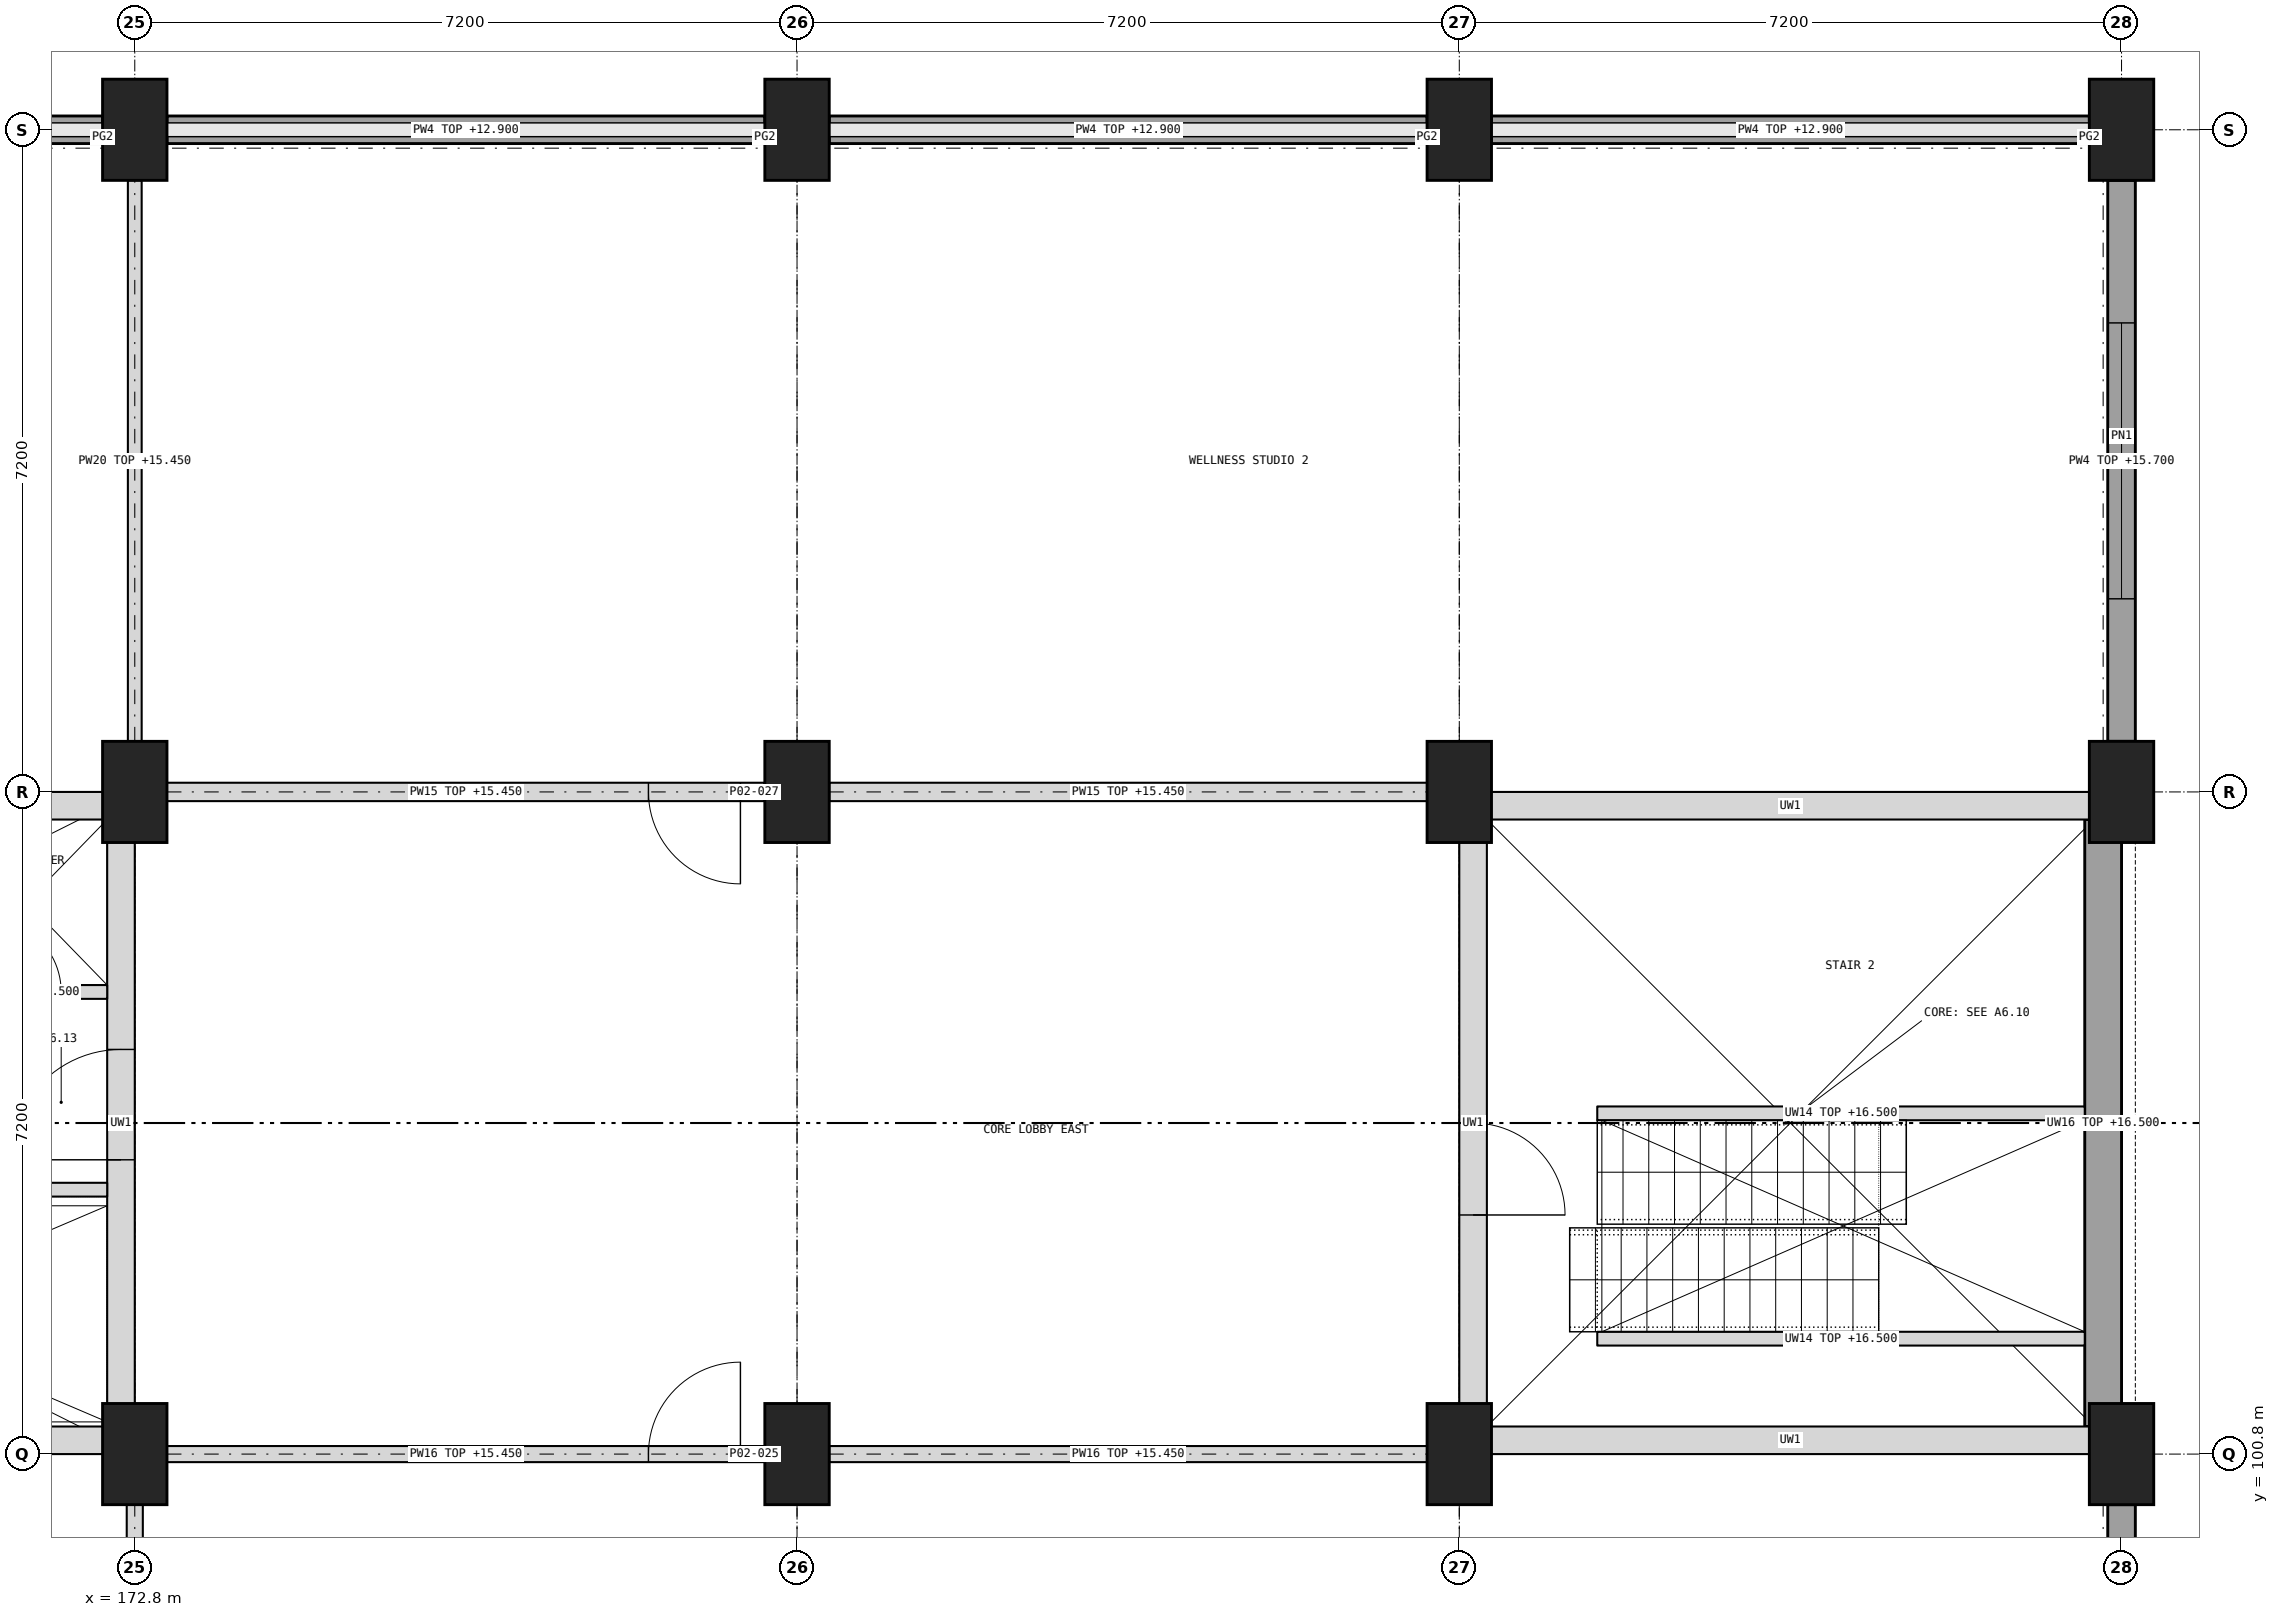
"""IFC4 building model, lengths in metres.
Left out: names, types, materials, properties, quantities, classifications, styles, units other than length and angle.
Written with IfcOpenShell. Run it as: python <this file> out.ifc"""

import sys

from ifc_helpers import new_model, si_unit, direction, frame, frame_2d, origin, origin_2d, place, context, subcontext, project, spatial, rectangle, extrude, element, fill, save


model = new_model("IFC4")
c1 = context("Model", 3, precision=1e-05, world=origin(), true_north=direction((0.0, 1.0)))
c2 = subcontext(c1, "Body", "Model", "MODEL_VIEW")
j1 = project(units=[si_unit("LENGTHUNIT", "METRE"), si_unit("PLANEANGLEUNIT", "RADIAN")], contexts=[c1])
p1 = place(None, origin())
s1 = spatial("IfcSite", under=j1, at=p1, CompositionType="ELEMENT")
p2 = place(p1, origin())
s2 = spatial("IfcBuilding", under=s1, at=p2, CompositionType="ELEMENT")
p3 = place(p2, frame((0.0, 0.0, 12.0)))
s3 = spatial("IfcBuildingStorey", under=s2, at=p3, CompositionType="ELEMENT", Elevation=12.0)
for number, where, z_axis, x_axis in (
    (1, (172.8, 100.8, 0.0), (0.0, 0.0, 1.0), (1.0, 0.0, 0.0)),
    (2, (172.8, 108.0, 0.0), (0.0, 0.0, 1.0), (1.0, 0.0, 0.0)),
    (3, (172.8, 115.2, 0.0), (0.0, 0.0, 1.0), (1.0, 0.0, 0.0)),
    (4, (180.0, 100.8, 0.0), (0.0, 0.0, 1.0), (1.0, 0.0, 0.0)),
    (5, (180.0, 108.0, 0.0), (0.0, 0.0, 1.0), (1.0, 0.0, 0.0)),
    (6, (180.0, 115.2, 0.0), (0.0, 0.0, 1.0), (1.0, 0.0, 0.0)),
    (7, (187.2, 100.8, 0.0), (0.0, 0.0, 1.0), (1.0, 0.0, 0.0)),
    (8, (187.2, 108.0, 0.0), (0.0, 0.0, 1.0), (1.0, 0.0, 0.0)),
    (9, (187.2, 115.2, 0.0), (0.0, 0.0, 1.0), (1.0, 0.0, 0.0)),
    (10, (194.4, 100.8, 0.0), (0.0, 0.0, 1.0), (1.0, 0.0, 0.0)),
    (11, (194.4, 108.0, 0.0), (0.0, 0.0, 1.0), (1.0, 0.0, 0.0)),
    (12, (194.4, 115.2, 0.0), (0.0, 0.0, 1.0), (1.0, 0.0, 0.0)),
):
    element("IfcColumn", number, at=place(p3, frame(where, z_axis=z_axis, x_axis=x_axis)), inside=s3, PredefinedType="COLUMN", context=c2, shape_type="SweptSolid", body=[
        extrude(rectangle(XDim=0.7, YDim=1.1, at=origin_2d()), origin(), (0.0, 0.0, 1.0), 4.5),
    ])
for number, where, z_axis, x_axis in (
    (13, (158.4, 100.95, 0.0), (0.0, 0.0, 1.0), (1.0, 0.0, 0.0)),
    (14, (158.4, 107.85, 0.0), (0.0, 0.0, 1.0), (1.0, 0.0, 0.0)),
):
    element("IfcWall", number, at=place(p3, frame(where, z_axis=z_axis, x_axis=x_axis)), inside=s3, PredefinedType="SHEAR", context=c2, shape_type="SweptSolid", body=[
        extrude(rectangle(XDim=14.4, YDim=0.3, at=frame_2d((7.2, 0.0))), origin(), (0.0, 0.0, 1.0), 4.5),
    ])
p4 = place(p3, frame((172.65, 101.1, 0.0), z_axis=(0.0, 0.0, 1.0), x_axis=(0.0, 1.0, 0.0)))
e15 = element("IfcWall", 15, at=p4, inside=s3, PredefinedType="SHEAR", context=c2, shape_type="SweptSolid", body=[
    extrude(rectangle(XDim=6.6, YDim=0.3, at=frame_2d((3.3, 0.0))), origin(), (0.0, 0.0, 1.0), 4.5),
])
p5 = place(p4, frame((2.9, 0.0, 0.0)))
e16 = element("IfcOpeningElement", 16, at=p5, cuts=e15, PredefinedType="OPENING", context=c2, shape_type="SweptSolid", body=[
    extrude(rectangle(XDim=1.2, YDim=2.1, at=frame_2d((0.6, 1.05))), frame((0.0, 0.16, 0.0), z_axis=(0.0, -1.0, 0.0), x_axis=(1.0, 0.0, 0.0)), (0.0, 0.0, 1.0), 0.32),
])
p6 = place(p3, frame((165.75, 103.675, 0.0), z_axis=(0.0, 0.0, 1.0), x_axis=(1.0, 0.0, 0.0)))
e17 = element("IfcWall", 17, at=p6, inside=s3, PredefinedType="SHEAR", context=c2, shape_type="SweptSolid", body=[
    extrude(rectangle(XDim=6.75, YDim=0.15, at=frame_2d((3.375, 0.0))), origin(), (0.0, 0.0, 1.0), 4.5),
])
p7 = place(p6, frame((0.1, 0.0, 0.0)))
e18 = element("IfcOpeningElement", 18, at=p7, cuts=e17, PredefinedType="OPENING", context=c2, shape_type="SweptSolid", body=[
    extrude(rectangle(XDim=1.0, YDim=2.1, at=frame_2d((0.5, 1.05))), frame((0.0, 0.085, 0.0), z_axis=(0.0, -1.0, 0.0), x_axis=(1.0, 0.0, 0.0)), (0.0, 0.0, 1.0), 0.17),
])
p8 = place(p3, frame((170.75, 105.825, 0.0), z_axis=(0.0, 0.0, 1.0), x_axis=(1.0, 0.0, 0.0)))
e19 = element("IfcWall", 19, at=p8, inside=s3, PredefinedType="PARTITIONING", context=c2, shape_type="SweptSolid", body=[
    extrude(rectangle(XDim=1.75, YDim=0.15, at=frame_2d((0.875, 0.0))), origin(), (0.0, 0.0, 1.0), 4.5),
])
p9 = place(p8, frame((0.45, 0.0, 0.0)))
e20 = element("IfcOpeningElement", 20, at=p9, cuts=e19, PredefinedType="OPENING", context=c2, shape_type="SweptSolid", body=[
    extrude(rectangle(XDim=0.8, YDim=2.1, at=frame_2d((0.4, 1.05))), frame((0.0, 0.085, 0.0), z_axis=(0.0, -1.0, 0.0), x_axis=(1.0, 0.0, 0.0)), (0.0, 0.0, 1.0), 0.17),
])
for number, where, z_axis, x_axis in (
    (21, (194.4, 100.95, 0.0), (0.0, 0.0, 1.0), (-1.0, 0.0, 0.0)),
    (22, (194.4, 107.85, 0.0), (0.0, 0.0, 1.0), (-1.0, 0.0, 0.0)),
):
    element("IfcWall", number, at=place(p3, frame(where, z_axis=z_axis, x_axis=x_axis)), inside=s3, PredefinedType="SHEAR", context=c2, shape_type="SweptSolid", body=[
        extrude(rectangle(XDim=7.2, YDim=0.3, at=frame_2d((3.6, 0.0))), origin(), (0.0, 0.0, 1.0), 4.5),
    ])
p10 = place(p3, frame((187.35, 101.1, 0.0), z_axis=(0.0, 0.0, 1.0), x_axis=(0.0, 1.0, 0.0)))
e23 = element("IfcWall", 23, at=p10, inside=s3, PredefinedType="SHEAR", context=c2, shape_type="SweptSolid", body=[
    extrude(rectangle(XDim=6.6, YDim=0.3, at=frame_2d((3.3, 0.0))), origin(), (0.0, 0.0, 1.0), 4.5),
])
p11 = place(p10, frame((2.3, 0.0, 0.0)))
e24 = element("IfcOpeningElement", 24, at=p11, cuts=e23, PredefinedType="OPENING", context=c2, shape_type="SweptSolid", body=[
    extrude(rectangle(XDim=1.0, YDim=2.1, at=frame_2d((0.5, 1.05))), frame((0.0, 0.16, 0.0), z_axis=(0.0, -1.0, 0.0), x_axis=(1.0, 0.0, 0.0)), (0.0, 0.0, 1.0), 0.32),
])
p12 = place(p3, frame((194.2, 101.1, 0.0), z_axis=(0.0, 0.0, 1.0), x_axis=(0.0, 1.0, 0.0)))
e25 = element("IfcWall", 25, at=p12, inside=s3, PredefinedType="SHEAR", context=c2, shape_type="SweptSolid", body=[
    extrude(rectangle(XDim=6.6, YDim=0.4, at=frame_2d((3.3, 0.0))), origin(), (0.0, 0.0, 1.0), 4.5),
])
for number, where, z_axis, x_axis in (
    (26, (188.7, 102.055, 0.0), (0.0, 0.0, 1.0), (1.0, 0.0, 0.0)),
    (27, (188.7, 104.505, 0.0), (0.0, 0.0, 1.0), (1.0, 0.0, 0.0)),
):
    element("IfcWall", number, at=place(p3, frame(where, z_axis=z_axis, x_axis=x_axis)), inside=s3, PredefinedType="SHEAR", context=c2, shape_type="SweptSolid", body=[
        extrude(rectangle(XDim=5.3, YDim=0.15, at=frame_2d((2.65, 0.0))), origin(), (0.0, 0.0, 1.0), 4.5),
    ])
for number, where, z_axis, x_axis in (
    (28, (165.95, 115.2, 0.0), (0.0, 0.0, 1.0), (1.0, 0.0, 0.0)),
    (29, (173.15, 115.2, 0.0), (0.0, 0.0, 1.0), (1.0, 0.0, 0.0)),
    (30, (180.35, 115.2, 0.0), (0.0, 0.0, 1.0), (1.0, 0.0, 0.0)),
    (31, (187.55, 115.2, 0.0), (0.0, 0.0, 1.0), (1.0, 0.0, 0.0)),
):
    element("IfcWall", number, at=place(p3, frame(where, z_axis=z_axis, x_axis=x_axis)), inside=s3, PredefinedType="SOLIDWALL", context=c2, shape_type="SweptSolid", body=[
        extrude(rectangle(XDim=6.5, YDim=0.3, at=frame_2d((3.25, 0.0))), origin(), (0.0, 0.0, 1.0), 0.9),
    ])
p13 = place(p3, frame((194.4, 94.15, 0.0), z_axis=(0.0, 0.0, 1.0), x_axis=(0.0, 1.0, 0.0)))
e32 = element("IfcWall", 32, at=p13, inside=s3, PredefinedType="SOLIDWALL", context=c2, shape_type="SweptSolid", body=[
    extrude(rectangle(XDim=6.1, YDim=0.3, at=frame_2d((3.05, 0.0))), origin(), (0.0, 0.0, 1.0), 3.7),
])
p14 = place(p13, frame((2.475, 0.0, 0.9)))
e33 = element("IfcOpeningElement", 33, at=p14, cuts=e32, PredefinedType="OPENING", context=c2, shape_type="SweptSolid", body=[
    extrude(rectangle(XDim=3.0, YDim=2.4, at=frame_2d((1.5, 1.2))), frame((0.0, 0.16, 0.0), z_axis=(0.0, -1.0, 0.0), x_axis=(1.0, 0.0, 0.0)), (0.0, 0.0, 1.0), 0.32),
])
p15 = place(p3, frame((194.4, 108.55, 0.0), z_axis=(0.0, 0.0, 1.0), x_axis=(0.0, 1.0, 0.0)))
e34 = element("IfcWall", 34, at=p15, inside=s3, PredefinedType="SOLIDWALL", context=c2, shape_type="SweptSolid", body=[
    extrude(rectangle(XDim=6.1, YDim=0.3, at=frame_2d((3.05, 0.0))), origin(), (0.0, 0.0, 1.0), 3.7),
])
p16 = place(p15, frame((1.55, 0.0, 0.9)))
e35 = element("IfcOpeningElement", 35, at=p16, cuts=e34, PredefinedType="OPENING", context=c2, shape_type="SweptSolid", body=[
    extrude(rectangle(XDim=3.0, YDim=2.4, at=frame_2d((1.5, 1.2))), frame((0.0, 0.16, 0.0), z_axis=(0.0, -1.0, 0.0), x_axis=(1.0, 0.0, 0.0)), (0.0, 0.0, 1.0), 0.32),
])
p17 = place(p3, frame((172.8, 96.087, 0.0), z_axis=(0.0, 0.0, 1.0), x_axis=(0.0, 1.0, 0.0)))
e36 = element("IfcWall", 36, at=p17, inside=s3, PredefinedType="PARTITIONING", context=c2, shape_type="SweptSolid", body=[
    extrude(rectangle(XDim=4.163, YDim=0.175, at=frame_2d((2.081, 0.0))), origin(), (0.0, 0.0, 1.0), 3.45),
])
p18 = place(p3, frame((172.8, 108.55, 0.0), z_axis=(0.0, 0.0, 1.0), x_axis=(0.0, 1.0, 0.0)))
e37 = element("IfcWall", 37, at=p18, inside=s3, PredefinedType="PARTITIONING", context=c2, shape_type="SweptSolid", body=[
    extrude(rectangle(XDim=6.1, YDim=0.15, at=frame_2d((3.05, 0.0))), origin(), (0.0, 0.0, 1.0), 3.45),
])
p19 = place(p3, frame((173.15, 108.0, 0.0), z_axis=(0.0, 0.0, 1.0), x_axis=(1.0, 0.0, 0.0)))
e38 = element("IfcWall", 38, at=p19, inside=s3, PredefinedType="PARTITIONING", context=c2, shape_type="SweptSolid", body=[
    extrude(rectangle(XDim=6.5, YDim=0.2, at=frame_2d((3.25, 0.0))), origin(), (0.0, 0.0, 1.0), 3.45),
])
p20 = place(p19, frame((5.235, 0.0, 0.0)))
e39 = element("IfcOpeningElement", 39, at=p20, cuts=e38, PredefinedType="OPENING", context=c2, shape_type="SweptSolid", body=[
    extrude(rectangle(XDim=1.0, YDim=2.1, at=frame_2d((0.5, 1.05))), frame((0.0, 0.11, 0.0), z_axis=(0.0, -1.0, 0.0), x_axis=(1.0, 0.0, 0.0)), (0.0, 0.0, 1.0), 0.22),
])
p21 = place(p3, frame((180.35, 108.0, 0.0), z_axis=(0.0, 0.0, 1.0), x_axis=(1.0, 0.0, 0.0)))
e40 = element("IfcWall", 40, at=p21, inside=s3, PredefinedType="PARTITIONING", context=c2, shape_type="SweptSolid", body=[
    extrude(rectangle(XDim=6.5, YDim=0.2, at=frame_2d((3.25, 0.0))), origin(), (0.0, 0.0, 1.0), 3.45),
])
p22 = place(p3, frame((173.15, 100.8, 0.0), z_axis=(0.0, 0.0, 1.0), x_axis=(1.0, 0.0, 0.0)))
e41 = element("IfcWall", 41, at=p22, inside=s3, PredefinedType="PARTITIONING", context=c2, shape_type="SweptSolid", body=[
    extrude(rectangle(XDim=6.5, YDim=0.175, at=frame_2d((3.25, 0.0))), origin(), (0.0, 0.0, 1.0), 3.45),
])
p23 = place(p22, frame((5.235, 0.0, 0.0)))
e42 = element("IfcOpeningElement", 42, at=p23, cuts=e41, PredefinedType="OPENING", context=c2, shape_type="SweptSolid", body=[
    extrude(rectangle(XDim=1.0, YDim=2.1, at=frame_2d((0.5, 1.05))), frame((0.0, 0.097, 0.0), z_axis=(0.0, -1.0, 0.0), x_axis=(1.0, 0.0, 0.0)), (0.0, 0.0, 1.0), 0.195),
])
p24 = place(p3, frame((180.35, 100.8, 0.0), z_axis=(0.0, 0.0, 1.0), x_axis=(1.0, 0.0, 0.0)))
e43 = element("IfcWall", 43, at=p24, inside=s3, PredefinedType="PARTITIONING", context=c2, shape_type="SweptSolid", body=[
    extrude(rectangle(XDim=6.5, YDim=0.175, at=frame_2d((3.25, 0.0))), origin(), (0.0, 0.0, 1.0), 3.45),
])
p25 = place(p16, origin())
e44 = element("IfcWindow", 44, at=p25, inside=s3, PartitioningType="DOUBLE_PANEL_VERTICAL", PredefinedType="WINDOW", context=c2, shape_type="SweptSolid", body=[
    extrude(rectangle(XDim=3.0, YDim=2.4, at=frame_2d((1.5, 1.2))), frame((0.0, 0.12, 0.0), z_axis=(0.0, -1.0, 0.0), x_axis=(1.0, 0.0, 0.0)), (0.0, 0.0, 1.0), 0.06),
])
fill(e35, e44)
p26 = place(p23, origin())
e45 = element("IfcDoor", 45, at=p26, inside=s3, OperationType="SINGLE_SWING_RIGHT", PredefinedType="DOOR", context=c2, shape_type="SweptSolid", body=[
    extrude(rectangle(XDim=1.0, YDim=2.1, at=frame_2d((0.5, 1.05))), frame((0.0, 0.025, 0.0), z_axis=(0.0, -1.0, 0.0), x_axis=(1.0, 0.0, 0.0)), (0.0, 0.0, 1.0), 0.05),
])
fill(e42, e45)
p27 = place(p20, frame((1.0, 0.0, 0.0), z_axis=(0.0, 0.0, 1.0), x_axis=(-1.0, 0.0, 0.0)))
e46 = element("IfcDoor", 46, at=p27, inside=s3, OperationType="SINGLE_SWING_LEFT", PredefinedType="DOOR", context=c2, shape_type="SweptSolid", body=[
    extrude(rectangle(XDim=1.0, YDim=2.1, at=frame_2d((0.5, 1.05))), frame((0.0, 0.025, 0.0), z_axis=(0.0, -1.0, 0.0), x_axis=(1.0, 0.0, 0.0)), (0.0, 0.0, 1.0), 0.05),
])
fill(e39, e46)
p28 = place(p5, origin())
e47 = element("IfcDoor", 47, at=p28, inside=s3, OperationType="SINGLE_SWING_LEFT", PredefinedType="DOOR", context=c2, shape_type="SweptSolid", body=[
    extrude(rectangle(XDim=1.2, YDim=2.1, at=frame_2d((0.6, 1.05))), frame((0.0, 0.025, 0.0), z_axis=(0.0, -1.0, 0.0), x_axis=(1.0, 0.0, 0.0)), (0.0, 0.0, 1.0), 0.05),
])
fill(e16, e47)
p29 = place(p9, origin())
e48 = element("IfcDoor", 48, at=p29, inside=s3, OperationType="SINGLE_SWING_LEFT", PredefinedType="DOOR", context=c2, shape_type="SweptSolid", body=[
    extrude(rectangle(XDim=0.8, YDim=2.1, at=frame_2d((0.4, 1.05))), frame((0.0, 0.025, 0.0), z_axis=(0.0, -1.0, 0.0), x_axis=(1.0, 0.0, 0.0)), (0.0, 0.0, 1.0), 0.05),
])
fill(e20, e48)
p30 = place(p11, frame((1.0, 0.0, 0.0), z_axis=(0.0, 0.0, 1.0), x_axis=(-1.0, 0.0, 0.0)))
e49 = element("IfcDoor", 49, at=p30, inside=s3, OperationType="SINGLE_SWING_RIGHT", PredefinedType="DOOR", context=c2, shape_type="SweptSolid", body=[
    extrude(rectangle(XDim=1.0, YDim=2.1, at=frame_2d((0.5, 1.05))), frame((0.0, 0.025, 0.0), z_axis=(0.0, -1.0, 0.0), x_axis=(1.0, 0.0, 0.0)), (0.0, 0.0, 1.0), 0.05),
])
fill(e24, e49)
save(model, sys.argv[1])
